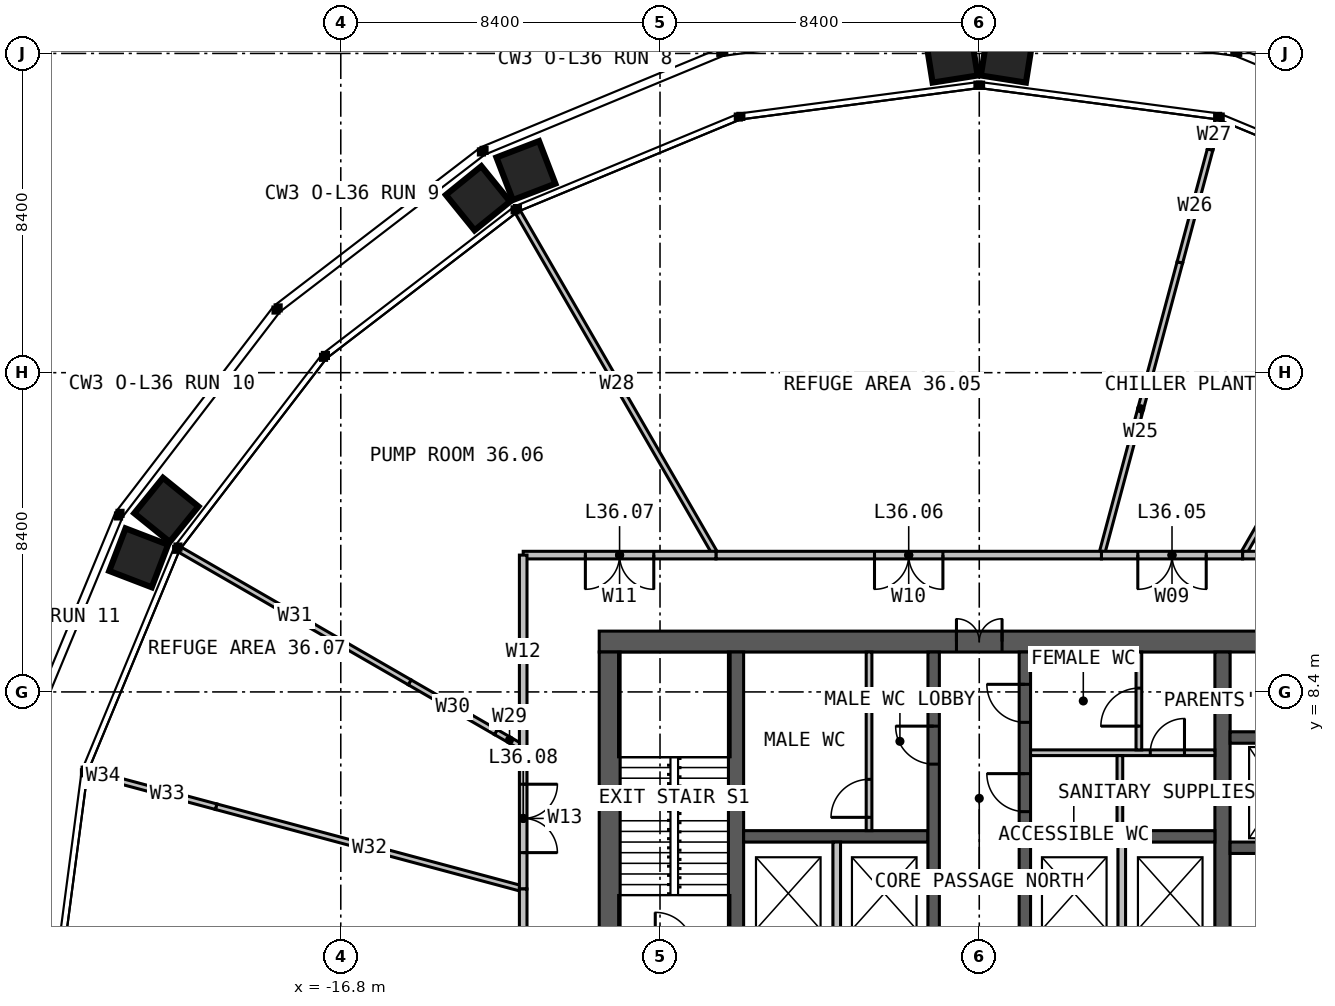
"""IFC4 building model, lengths in metres.
Left out: names, types, materials, properties, quantities, classifications, styles, units other than length and angle.
Written with IfcOpenShell. Run it as: python <this file> out.ifc"""

import sys

from ifc_helpers import new_model, si_unit, direction, frame, frame_2d, origin, place, context, subcontext, project, spatial, rectangle, extrude, element, fill, save


model = new_model("IFC4")
c1 = context("Model", 3, precision=1e-05, world=origin(), true_north=direction((0.0, 1.0)))
c2 = subcontext(c1, "Body", "Model", "MODEL_VIEW")
j1 = project(units=[si_unit("LENGTHUNIT", "METRE"), si_unit("PLANEANGLEUNIT", "RADIAN")], contexts=[c1])
p1 = place(None, origin())
s1 = spatial("IfcSite", under=j1, at=p1, CompositionType="ELEMENT")
p2 = place(p1, origin())
s2 = spatial("IfcBuilding", under=s1, at=p2, CompositionType="ELEMENT")
p3 = place(p2, frame((0.0, 0.0, 150.0)))
s3 = spatial("IfcBuildingStorey", under=s2, at=p3, CompositionType="ELEMENT", Elevation=150.0)
p4 = place(p3, frame((-10.0, 9.725, 0.0), z_axis=(0.0, 0.0, 1.0), x_axis=(1.0, 0.0, 0.0)))
e1 = element("IfcWall", 1, at=p4, inside=s3, PredefinedType="SOLIDWALL", context=c2, shape_type="SweptSolid", body=[
    extrude(rectangle(XDim=20.0, YDim=0.55, at=frame_2d((10.0, 0.0))), origin(), (0.0, 0.0, 1.0), 5.0),
])
p5 = place(p4, frame((9.4, 0.0, 0.0)))
e2 = element("IfcOpeningElement", 2, at=p5, cuts=e1, PredefinedType="OPENING", context=c2, shape_type="SweptSolid", body=[
    extrude(rectangle(XDim=1.2, YDim=2.2, at=frame_2d((0.6, 1.1))), frame((0.0, 0.285, 0.0), z_axis=(0.0, -1.0, 0.0), x_axis=(1.0, 0.0, 0.0)), (0.0, 0.0, 1.0), 0.57),
])
p6 = place(p3, frame((-9.725, 9.45, 0.0), z_axis=(0.0, 0.0, 1.0), x_axis=(0.0, -1.0, 0.0)))
e3 = element("IfcWall", 3, at=p6, inside=s3, PredefinedType="SOLIDWALL", context=c2, shape_type="SweptSolid", body=[
    extrude(rectangle(XDim=18.9, YDim=0.55, at=frame_2d((9.45, 0.0))), origin(), (0.0, 0.0, 1.0), 5.0),
])
p7 = place(p3, frame((-6.4, -9.45, 0.0), z_axis=(0.0, 0.0, 1.0), x_axis=(0.0, 1.0, 0.0)))
e4 = element("IfcWall", 4, at=p7, inside=s3, PredefinedType="SOLIDWALL", context=c2, shape_type="SweptSolid", body=[
    extrude(rectangle(XDim=18.9, YDim=0.4, at=frame_2d((9.45, 0.0))), origin(), (0.0, 0.0, 1.0), 5.0),
])
p8 = place(p7, frame((8.95, 0.0, 0.0)))
e5 = element("IfcOpeningElement", 5, at=p8, cuts=e4, PredefinedType="OPENING", context=c2, shape_type="SweptSolid", body=[
    extrude(rectangle(XDim=1.0, YDim=2.2, at=frame_2d((0.5, 1.1))), frame((0.0, 0.21, 0.0), z_axis=(0.0, -1.0, 0.0), x_axis=(1.0, 0.0, 0.0)), (0.0, 0.0, 1.0), 0.42),
])
p9 = place(p3, frame((6.4, 9.45, 0.0), z_axis=(0.0, 0.0, 1.0), x_axis=(0.0, -1.0, 0.0)))
e6 = element("IfcWall", 6, at=p9, inside=s3, PredefinedType="SOLIDWALL", context=c2, shape_type="SweptSolid", body=[
    extrude(rectangle(XDim=18.9, YDim=0.4, at=frame_2d((9.45, 0.0))), origin(), (0.0, 0.0, 1.0), 5.0),
])
p10 = place(p9, frame((8.95, 0.0, 0.0)))
e7 = element("IfcOpeningElement", 7, at=p10, cuts=e6, PredefinedType="OPENING", context=c2, shape_type="SweptSolid", body=[
    extrude(rectangle(XDim=1.0, YDim=2.2, at=frame_2d((0.5, 1.1))), frame((0.0, 0.21, 0.0), z_axis=(0.0, -1.0, 0.0), x_axis=(1.0, 0.0, 0.0)), (0.0, 0.0, 1.0), 0.42),
])
for number, where, z_axis, x_axis in (
    (8, (-6.2, 4.6, 0.0), (0.0, 0.0, 1.0), (1.0, 0.0, 0.0)),
    (9, (1.35, 4.6, 0.0), (0.0, 0.0, 1.0), (1.0, 0.0, 0.0)),
):
    element("IfcWall", number, at=place(p3, frame(where, z_axis=z_axis, x_axis=x_axis)), inside=s3, PredefinedType="SOLIDWALL", context=c2, shape_type="SweptSolid", body=[
        extrude(rectangle(XDim=4.85, YDim=0.3, at=frame_2d((2.425, 0.0))), origin(), (0.0, 0.0, 1.0), 5.0),
    ])
p11 = place(p3, frame((-1.2, 1.45, 0.0), z_axis=(0.0, 0.0, 1.0), x_axis=(0.0, 1.0, 0.0)))
e10 = element("IfcWall", 10, at=p11, inside=s3, PredefinedType="SOLIDWALL", context=c2, shape_type="SweptSolid", body=[
    extrude(rectangle(XDim=8.0, YDim=0.3, at=frame_2d((4.0, 0.0))), origin(), (0.0, 0.0, 1.0), 5.0),
])
p12 = place(p11, frame((5.05, 0.0, 0.0)))
e11 = element("IfcOpeningElement", 11, at=p12, cuts=e10, PredefinedType="OPENING", context=c2, shape_type="SweptSolid", body=[
    extrude(rectangle(XDim=1.0, YDim=2.2, at=frame_2d((0.5, 1.1))), frame((0.0, 0.16, 0.0), z_axis=(0.0, -1.0, 0.0), x_axis=(1.0, 0.0, 0.0)), (0.0, 0.0, 1.0), 0.32),
])
p13 = place(p3, frame((1.2, 1.45, 0.0), z_axis=(0.0, 0.0, 1.0), x_axis=(0.0, 1.0, 0.0)))
e12 = element("IfcWall", 12, at=p13, inside=s3, PredefinedType="SOLIDWALL", context=c2, shape_type="SweptSolid", body=[
    extrude(rectangle(XDim=8.0, YDim=0.3, at=frame_2d((4.0, 0.0))), origin(), (0.0, 0.0, 1.0), 5.0),
])
p14 = place(p13, frame((3.8, 0.0, 0.0)))
e13 = element("IfcOpeningElement", 13, at=p14, cuts=e12, PredefinedType="OPENING", context=c2, shape_type="SweptSolid", body=[
    extrude(rectangle(XDim=1.0, YDim=2.2, at=frame_2d((0.5, 1.1))), frame((0.0, 0.16, 0.0), z_axis=(0.0, -1.0, 0.0), x_axis=(1.0, 0.0, 0.0)), (0.0, 0.0, 1.0), 0.32),
])
p15 = place(p13, frame((6.15, 0.0, 0.0)))
e14 = element("IfcOpeningElement", 14, at=p15, cuts=e12, PredefinedType="OPENING", context=c2, shape_type="SweptSolid", body=[
    extrude(rectangle(XDim=1.0, YDim=2.2, at=frame_2d((0.5, 1.1))), frame((0.0, 0.16, 0.0), z_axis=(0.0, -1.0, 0.0), x_axis=(1.0, 0.0, 0.0)), (0.0, 0.0, 1.0), 0.32),
])
p16 = place(p3, frame((6.6, 4.3, 0.0), z_axis=(0.0, 0.0, 1.0), x_axis=(1.0, 0.0, 0.0)))
e15 = element("IfcWall", 15, at=p16, inside=s3, PredefinedType="SOLIDWALL", context=c2, shape_type="SweptSolid", body=[
    extrude(rectangle(XDim=2.85, YDim=0.3, at=frame_2d((1.425, 0.0))), origin(), (0.0, 0.0, 1.0), 5.0),
])
p17 = place(p16, frame((0.75, 0.0, 0.0)))
e16 = element("IfcOpeningElement", 16, at=p17, cuts=e15, PredefinedType="OPENING", context=c2, shape_type="SweptSolid", body=[
    extrude(rectangle(XDim=1.1, YDim=2.2, at=frame_2d((0.55, 1.1))), frame((0.0, 0.16, 0.0), z_axis=(0.0, -1.0, 0.0), x_axis=(1.0, 0.0, 0.0)), (0.0, 0.0, 1.0), 0.32),
])
p18 = place(p3, frame((6.6, 7.2, 0.0), z_axis=(0.0, 0.0, 1.0), x_axis=(1.0, 0.0, 0.0)))
e17 = element("IfcWall", 17, at=p18, inside=s3, PredefinedType="SOLIDWALL", context=c2, shape_type="SweptSolid", body=[
    extrude(rectangle(XDim=2.85, YDim=0.3, at=frame_2d((1.425, 0.0))), origin(), (0.0, 0.0, 1.0), 5.0),
])
for number, where, z_axis, x_axis in (
    (18, (-3.75, 1.75, 0.0), (0.0, 0.0, 1.0), (0.0, 1.0, 0.0)),
    (19, (3.75, 1.75, 0.0), (0.0, 0.0, 1.0), (0.0, 1.0, 0.0)),
):
    element("IfcWall", number, at=place(p3, frame(where, z_axis=z_axis, x_axis=x_axis)), inside=s3, PredefinedType="SOLIDWALL", context=c2, shape_type="SweptSolid", body=[
        extrude(rectangle(XDim=2.7, YDim=0.2, at=frame_2d((1.35, 0.0))), origin(), (0.0, 0.0, 1.0), 4.75),
    ])
p19 = place(p3, frame((1.35, 6.8, 0.0), z_axis=(0.0, 0.0, 1.0), x_axis=(1.0, 0.0, 0.0)))
e20 = element("IfcWall", 20, at=p19, inside=s3, PredefinedType="PARTITIONING", context=c2, shape_type="SweptSolid", body=[
    extrude(rectangle(XDim=4.85, YDim=0.15, at=frame_2d((2.425, 0.0))), origin(), (0.0, 0.0, 1.0), 4.75),
])
p20 = place(p19, frame((3.15, 0.0, 0.0)))
e21 = element("IfcOpeningElement", 21, at=p20, cuts=e20, PredefinedType="OPENING", context=c2, shape_type="SweptSolid", body=[
    extrude(rectangle(XDim=0.9, YDim=2.2, at=frame_2d((0.45, 1.1))), frame((0.0, 0.085, 0.0), z_axis=(0.0, -1.0, 0.0), x_axis=(1.0, 0.0, 0.0)), (0.0, 0.0, 1.0), 0.17),
])
p21 = place(p3, frame((3.7, 4.75, 0.0), z_axis=(0.0, 0.0, 1.0), x_axis=(0.0, 1.0, 0.0)))
e22 = element("IfcWall", 22, at=p21, inside=s3, PredefinedType="PARTITIONING", context=c2, shape_type="SweptSolid", body=[
    extrude(rectangle(XDim=1.975, YDim=0.15, at=frame_2d((0.988, 0.0))), origin(), (0.0, 0.0, 1.0), 4.75),
])
p22 = place(p3, frame((4.2, 6.875, 0.0), z_axis=(0.0, 0.0, 1.0), x_axis=(0.0, 1.0, 0.0)))
e23 = element("IfcWall", 23, at=p22, inside=s3, PredefinedType="PARTITIONING", context=c2, shape_type="SweptSolid", body=[
    extrude(rectangle(XDim=2.575, YDim=0.15, at=frame_2d((1.288, 0.0))), origin(), (0.0, 0.0, 1.0), 4.75),
])
p23 = place(p22, frame((0.625, 0.0, 0.0)))
e24 = element("IfcOpeningElement", 24, at=p23, cuts=e23, PredefinedType="OPENING", context=c2, shape_type="SweptSolid", body=[
    extrude(rectangle(XDim=1.0, YDim=2.2, at=frame_2d((0.5, 1.1))), frame((0.0, 0.085, 0.0), z_axis=(0.0, -1.0, 0.0), x_axis=(1.0, 0.0, 0.0)), (0.0, 0.0, 1.0), 0.17),
])
p24 = place(p3, frame((-2.9, 4.75, 0.0), z_axis=(0.0, 0.0, 1.0), x_axis=(0.0, 1.0, 0.0)))
e25 = element("IfcWall", 25, at=p24, inside=s3, PredefinedType="PARTITIONING", context=c2, shape_type="SweptSolid", body=[
    extrude(rectangle(XDim=4.7, YDim=0.15, at=frame_2d((2.35, 0.0))), origin(), (0.0, 0.0, 1.0), 4.75),
])
p25 = place(p24, frame((0.35, 0.0, 0.0)))
e26 = element("IfcOpeningElement", 26, at=p25, cuts=e25, PredefinedType="OPENING", context=c2, shape_type="SweptSolid", body=[
    extrude(rectangle(XDim=1.0, YDim=2.2, at=frame_2d((0.5, 1.1))), frame((0.0, 0.085, 0.0), z_axis=(0.0, -1.0, 0.0), x_axis=(1.0, 0.0, 0.0)), (0.0, 0.0, 1.0), 0.17),
])
p26 = place(p3, frame((6.928, 12.0, 0.0), z_axis=(0.0, 0.0, 1.0), x_axis=(0.500003616288, 0.866023315909, 0.0)))
e27 = element("IfcWall", 27, at=p26, inside=s3, PredefinedType="PARTITIONING", context=c2, shape_type="SweptSolid", body=[
    extrude(rectangle(XDim=10.423, YDim=0.15, at=frame_2d((5.211, 0.0))), origin(), (0.0, 0.0, 1.0), 4.8),
])
p27 = place(p3, frame((3.215, 12.0, 0.0), z_axis=(0.0, 0.0, 1.0), x_axis=(0.258826894995, 0.965923722882, 0.0)))
e28 = element("IfcWall", 28, at=p27, inside=s3, PredefinedType="PARTITIONING", context=c2, shape_type="SweptSolid", body=[
    extrude(rectangle(XDim=7.973, YDim=0.15, at=frame_2d((3.987, 0.0))), origin(), (0.0, 0.0, 1.0), 4.8),
])
p28 = place(p3, frame((5.279, 19.702, 0.0), z_axis=(0.0, 0.0, 1.0), x_axis=(0.258819472716, 0.96592571171, 0.0)))
e29 = element("IfcWall", 29, at=p28, inside=s3, PredefinedType="PARTITIONING", context=c2, shape_type="SweptSolid", body=[
    extrude(rectangle(XDim=3.073, YDim=0.15, at=frame_2d((1.537, 0.0))), origin(), (0.0, 0.0, 1.0), 3.79),
])
p29 = place(p3, frame((6.074, 22.67, 0.0), z_axis=(0.0, 0.0, 1.0), x_axis=(0.258826555959, 0.96592381373, 0.0)))
e30 = element("IfcWall", 30, at=p29, inside=s3, PredefinedType="PARTITIONING", context=c2, shape_type="SweptSolid", body=[
    extrude(rectangle(XDim=0.809, YDim=0.15, at=frame_2d((0.405, 0.0))), origin(), (0.0, 0.0, 1.0), 4.8),
])
p30 = place(p3, frame((-6.928, 12.0, 0.0), z_axis=(0.0, 0.0, 1.0), x_axis=(-0.500003616288, 0.866023315909, 0.0)))
e31 = element("IfcWall", 31, at=p30, inside=s3, PredefinedType="PARTITIONING", context=c2, shape_type="SweptSolid", body=[
    extrude(rectangle(XDim=10.423, YDim=0.15, at=frame_2d((5.211, 0.0))), origin(), (0.0, 0.0, 1.0), 4.8),
])
p31 = place(p3, frame((-12.0, 6.928, 0.0), z_axis=(0.0, 0.0, 1.0), x_axis=(-0.86608282171, 0.499900536046, 0.0)))
e32 = element("IfcWall", 32, at=p31, inside=s3, PredefinedType="PARTITIONING", context=c2, shape_type="SweptSolid", body=[
    extrude(rectangle(XDim=0.831, YDim=0.15, at=frame_2d((0.416, 0.0))), origin(), (0.0, 0.0, 1.0), 4.8),
])
p32 = place(p3, frame((-12.719, 7.344, 0.0), z_axis=(0.0, 0.0, 1.0), x_axis=(-0.866002361659, 0.500039908008, 0.0)))
e33 = element("IfcWall", 33, at=p32, inside=s3, PredefinedType="PARTITIONING", context=c2, shape_type="SweptSolid", body=[
    extrude(rectangle(XDim=2.618, YDim=0.15, at=frame_2d((1.309, 0.0))), origin(), (0.0, 0.0, 1.0), 3.79),
])
p33 = place(p3, frame((-14.987, 8.653, 0.0), z_axis=(0.0, 0.0, 1.0), x_axis=(-0.86602409414, 0.500002268364, 0.0)))
e34 = element("IfcWall", 34, at=p33, inside=s3, PredefinedType="PARTITIONING", context=c2, shape_type="SweptSolid", body=[
    extrude(rectangle(XDim=6.974, YDim=0.15, at=frame_2d((3.487, 0.0))), origin(), (0.0, 0.0, 1.0), 4.8),
])
p34 = place(p3, frame((-12.0, 3.215, 0.0), z_axis=(0.0, 0.0, 1.0), x_axis=(-0.965920824038, 0.258837713037, 0.0)))
e35 = element("IfcWall", 35, at=p34, inside=s3, PredefinedType="PARTITIONING", context=c2, shape_type="SweptSolid", body=[
    extrude(rectangle(XDim=8.365, YDim=0.15, at=frame_2d((4.183, 0.0))), origin(), (0.0, 0.0, 1.0), 4.8),
])
p35 = place(p3, frame((-20.08, 5.381, 0.0), z_axis=(0.0, 0.0, 1.0), x_axis=(-0.965936190415, 0.258780362559, 0.0)))
e36 = element("IfcWall", 36, at=p35, inside=s3, PredefinedType="PARTITIONING", context=c2, shape_type="SweptSolid", body=[
    extrude(rectangle(XDim=2.664, YDim=0.15, at=frame_2d((1.332, 0.0))), origin(), (0.0, 0.0, 1.0), 3.79),
])
p36 = place(p3, frame((-22.654, 6.07, 0.0), z_axis=(0.0, 0.0, 1.0), x_axis=(-0.96592035307, 0.258839470569, 0.0)))
e37 = element("IfcWall", 37, at=p36, inside=s3, PredefinedType="PARTITIONING", context=c2, shape_type="SweptSolid", body=[
    extrude(rectangle(XDim=0.826, YDim=0.15, at=frame_2d((0.413, 0.0))), origin(), (0.0, 0.0, 1.0), 4.8),
])
p37 = place(p3, frame((12.0, 12.0, 0.0), z_axis=(0.0, 0.0, 1.0), x_axis=(-1.0, 0.0, 0.0)))
e38 = element("IfcWall", 38, at=p37, inside=s3, PredefinedType="PARTITIONING", context=c2, shape_type="SweptSolid", body=[
    extrude(rectangle(XDim=5.072, YDim=0.2, at=frame_2d((2.536, 0.0))), origin(), (0.0, 0.0, 1.0), 4.8),
])
p38 = place(p37, frame((1.636, 0.0, 0.0)))
e39 = element("IfcOpeningElement", 39, at=p38, cuts=e38, PredefinedType="OPENING", context=c2, shape_type="SweptSolid", body=[
    extrude(rectangle(XDim=1.8, YDim=2.2, at=frame_2d((0.9, 1.1))), frame((0.0, 0.11, 0.0), z_axis=(0.0, -1.0, 0.0), x_axis=(1.0, 0.0, 0.0)), (0.0, 0.0, 1.0), 0.22),
])
p39 = place(p3, frame((6.928, 12.0, 0.0), z_axis=(0.0, 0.0, 1.0), x_axis=(-1.0, 0.0, 0.0)))
e40 = element("IfcWall", 40, at=p39, inside=s3, PredefinedType="PARTITIONING", context=c2, shape_type="SweptSolid", body=[
    extrude(rectangle(XDim=3.713, YDim=0.2, at=frame_2d((1.856, 0.0))), origin(), (0.0, 0.0, 1.0), 4.8),
])
p40 = place(p39, frame((0.956, 0.0, 0.0)))
e41 = element("IfcOpeningElement", 41, at=p40, cuts=e40, PredefinedType="OPENING", context=c2, shape_type="SweptSolid", body=[
    extrude(rectangle(XDim=1.8, YDim=2.2, at=frame_2d((0.9, 1.1))), frame((0.0, 0.11, 0.0), z_axis=(0.0, -1.0, 0.0), x_axis=(1.0, 0.0, 0.0)), (0.0, 0.0, 1.0), 0.22),
])
p41 = place(p3, frame((3.215, 12.0, 0.0), z_axis=(0.0, 0.0, 1.0), x_axis=(-1.0, 0.0, 0.0)))
e42 = element("IfcWall", 42, at=p41, inside=s3, PredefinedType="PARTITIONING", context=c2, shape_type="SweptSolid", body=[
    extrude(rectangle(XDim=10.144, YDim=0.2, at=frame_2d((5.072, 0.0))), origin(), (0.0, 0.0, 1.0), 4.8),
])
p42 = place(p41, frame((4.172, 0.0, 0.0)))
e43 = element("IfcOpeningElement", 43, at=p42, cuts=e42, PredefinedType="OPENING", context=c2, shape_type="SweptSolid", body=[
    extrude(rectangle(XDim=1.8, YDim=2.2, at=frame_2d((0.9, 1.1))), frame((0.0, 0.11, 0.0), z_axis=(0.0, -1.0, 0.0), x_axis=(1.0, 0.0, 0.0)), (0.0, 0.0, 1.0), 0.22),
])
p43 = place(p3, frame((-6.928, 12.0, 0.0), z_axis=(0.0, 0.0, 1.0), x_axis=(-1.0, 0.0, 0.0)))
e44 = element("IfcWall", 44, at=p43, inside=s3, PredefinedType="PARTITIONING", context=c2, shape_type="SweptSolid", body=[
    extrude(rectangle(XDim=5.072, YDim=0.2, at=frame_2d((2.536, 0.0))), origin(), (0.0, 0.0, 1.0), 4.8),
])
p44 = place(p43, frame((1.636, 0.0, 0.0)))
e45 = element("IfcOpeningElement", 45, at=p44, cuts=e44, PredefinedType="OPENING", context=c2, shape_type="SweptSolid", body=[
    extrude(rectangle(XDim=1.8, YDim=2.2, at=frame_2d((0.9, 1.1))), frame((0.0, 0.11, 0.0), z_axis=(0.0, -1.0, 0.0), x_axis=(1.0, 0.0, 0.0)), (0.0, 0.0, 1.0), 0.22),
])
p45 = place(p3, frame((-12.0, 12.0, 0.0), z_axis=(0.0, 0.0, 1.0), x_axis=(0.0, -1.0, 0.0)))
e46 = element("IfcWall", 46, at=p45, inside=s3, PredefinedType="PARTITIONING", context=c2, shape_type="SweptSolid", body=[
    extrude(rectangle(XDim=5.072, YDim=0.2, at=frame_2d((2.536, 0.0))), origin(), (0.0, 0.0, 1.0), 4.8),
])
p46 = place(p3, frame((-12.0, 6.928, 0.0), z_axis=(0.0, 0.0, 1.0), x_axis=(0.0, -1.0, 0.0)))
e47 = element("IfcWall", 47, at=p46, inside=s3, PredefinedType="PARTITIONING", context=c2, shape_type="SweptSolid", body=[
    extrude(rectangle(XDim=3.713, YDim=0.2, at=frame_2d((1.856, 0.0))), origin(), (0.0, 0.0, 1.0), 4.8),
])
p47 = place(p46, frame((0.956, 0.0, 0.0)))
e48 = element("IfcOpeningElement", 48, at=p47, cuts=e47, PredefinedType="OPENING", context=c2, shape_type="SweptSolid", body=[
    extrude(rectangle(XDim=1.8, YDim=2.2, at=frame_2d((0.9, 1.1))), frame((0.0, 0.11, 0.0), z_axis=(0.0, -1.0, 0.0), x_axis=(1.0, 0.0, 0.0)), (0.0, 0.0, 1.0), 0.22),
])
p48 = place(p3, frame((-12.0, 3.215, 0.0), z_axis=(0.0, 0.0, 1.0), x_axis=(0.0, -1.0, 0.0)))
e49 = element("IfcWall", 49, at=p48, inside=s3, PredefinedType="PARTITIONING", context=c2, shape_type="SweptSolid", body=[
    extrude(rectangle(XDim=10.144, YDim=0.2, at=frame_2d((5.072, 0.0))), origin(), (0.0, 0.0, 1.0), 4.8),
])
p49 = place(p48, frame((4.172, 0.0, 0.0)))
e50 = element("IfcOpeningElement", 50, at=p49, cuts=e49, PredefinedType="OPENING", context=c2, shape_type="SweptSolid", body=[
    extrude(rectangle(XDim=1.8, YDim=2.2, at=frame_2d((0.9, 1.1))), frame((0.0, 0.11, 0.0), z_axis=(0.0, -1.0, 0.0), x_axis=(1.0, 0.0, 0.0)), (0.0, 0.0, 1.0), 0.22),
])
p50 = place(p5, origin())
e51 = element("IfcDoor", 51, at=p50, inside=s3, OperationType="DOUBLE_DOOR_SINGLE_SWING", PredefinedType="DOOR", context=c2, shape_type="SweptSolid", body=[
    extrude(rectangle(XDim=1.2, YDim=2.2, at=frame_2d((0.6, 1.1))), frame((0.0, 0.025, 0.0), z_axis=(0.0, -1.0, 0.0), x_axis=(1.0, 0.0, 0.0)), (0.0, 0.0, 1.0), 0.05),
])
fill(e2, e51)
p51 = place(p12, origin())
e52 = element("IfcDoor", 52, at=p51, inside=s3, OperationType="SINGLE_SWING_RIGHT", PredefinedType="DOOR", context=c2, shape_type="SweptSolid", body=[
    extrude(rectangle(XDim=1.0, YDim=2.2, at=frame_2d((0.5, 1.1))), frame((0.0, 0.025, 0.0), z_axis=(0.0, -1.0, 0.0), x_axis=(1.0, 0.0, 0.0)), (0.0, 0.0, 1.0), 0.05),
])
fill(e11, e52)
p52 = place(p14, origin())
e53 = element("IfcDoor", 53, at=p52, inside=s3, OperationType="SINGLE_SWING_RIGHT", PredefinedType="DOOR", context=c2, shape_type="SweptSolid", body=[
    extrude(rectangle(XDim=1.0, YDim=2.2, at=frame_2d((0.5, 1.1))), frame((0.0, 0.025, 0.0), z_axis=(0.0, -1.0, 0.0), x_axis=(1.0, 0.0, 0.0)), (0.0, 0.0, 1.0), 0.05),
])
fill(e13, e53)
p53 = place(p15, origin())
e54 = element("IfcDoor", 54, at=p53, inside=s3, OperationType="SINGLE_SWING_RIGHT", PredefinedType="DOOR", context=c2, shape_type="SweptSolid", body=[
    extrude(rectangle(XDim=1.0, YDim=2.2, at=frame_2d((0.5, 1.1))), frame((0.0, 0.025, 0.0), z_axis=(0.0, -1.0, 0.0), x_axis=(1.0, 0.0, 0.0)), (0.0, 0.0, 1.0), 0.05),
])
fill(e14, e54)
p54 = place(p20, origin())
e55 = element("IfcDoor", 55, at=p54, inside=s3, OperationType="SINGLE_SWING_RIGHT", PredefinedType="DOOR", context=c2, shape_type="SweptSolid", body=[
    extrude(rectangle(XDim=0.9, YDim=2.2, at=frame_2d((0.45, 1.1))), frame((0.0, 0.025, 0.0), z_axis=(0.0, -1.0, 0.0), x_axis=(1.0, 0.0, 0.0)), (0.0, 0.0, 1.0), 0.05),
])
fill(e21, e55)
p55 = place(p23, origin())
e56 = element("IfcDoor", 56, at=p55, inside=s3, OperationType="SINGLE_SWING_LEFT", PredefinedType="DOOR", context=c2, shape_type="SweptSolid", body=[
    extrude(rectangle(XDim=1.0, YDim=2.2, at=frame_2d((0.5, 1.1))), frame((0.0, 0.025, 0.0), z_axis=(0.0, -1.0, 0.0), x_axis=(1.0, 0.0, 0.0)), (0.0, 0.0, 1.0), 0.05),
])
fill(e24, e56)
p56 = place(p25, origin())
e57 = element("IfcDoor", 57, at=p56, inside=s3, OperationType="SINGLE_SWING_LEFT", PredefinedType="DOOR", context=c2, shape_type="SweptSolid", body=[
    extrude(rectangle(XDim=1.0, YDim=2.2, at=frame_2d((0.5, 1.1))), frame((0.0, 0.025, 0.0), z_axis=(0.0, -1.0, 0.0), x_axis=(1.0, 0.0, 0.0)), (0.0, 0.0, 1.0), 0.05),
])
fill(e26, e57)
p57 = place(p40, origin())
e58 = element("IfcDoor", 58, at=p57, inside=s3, OperationType="DOUBLE_DOOR_SINGLE_SWING", PredefinedType="DOOR", context=c2, shape_type="SweptSolid", body=[
    extrude(rectangle(XDim=1.8, YDim=2.2, at=frame_2d((0.9, 1.1))), frame((0.0, 0.025, 0.0), z_axis=(0.0, -1.0, 0.0), x_axis=(1.0, 0.0, 0.0)), (0.0, 0.0, 1.0), 0.05),
])
fill(e41, e58)
p58 = place(p42, origin())
e59 = element("IfcDoor", 59, at=p58, inside=s3, OperationType="DOUBLE_DOOR_SINGLE_SWING", PredefinedType="DOOR", context=c2, shape_type="SweptSolid", body=[
    extrude(rectangle(XDim=1.8, YDim=2.2, at=frame_2d((0.9, 1.1))), frame((0.0, 0.025, 0.0), z_axis=(0.0, -1.0, 0.0), x_axis=(1.0, 0.0, 0.0)), (0.0, 0.0, 1.0), 0.05),
])
fill(e43, e59)
p59 = place(p44, origin())
e60 = element("IfcDoor", 60, at=p59, inside=s3, OperationType="DOUBLE_DOOR_SINGLE_SWING", PredefinedType="DOOR", context=c2, shape_type="SweptSolid", body=[
    extrude(rectangle(XDim=1.8, YDim=2.2, at=frame_2d((0.9, 1.1))), frame((0.0, 0.025, 0.0), z_axis=(0.0, -1.0, 0.0), x_axis=(1.0, 0.0, 0.0)), (0.0, 0.0, 1.0), 0.05),
])
fill(e45, e60)
p60 = place(p47, origin())
e61 = element("IfcDoor", 61, at=p60, inside=s3, OperationType="DOUBLE_DOOR_SINGLE_SWING", PredefinedType="DOOR", context=c2, shape_type="SweptSolid", body=[
    extrude(rectangle(XDim=1.8, YDim=2.2, at=frame_2d((0.9, 1.1))), frame((0.0, 0.025, 0.0), z_axis=(0.0, -1.0, 0.0), x_axis=(1.0, 0.0, 0.0)), (0.0, 0.0, 1.0), 0.05),
])
fill(e48, e61)
save(model, sys.argv[1])
